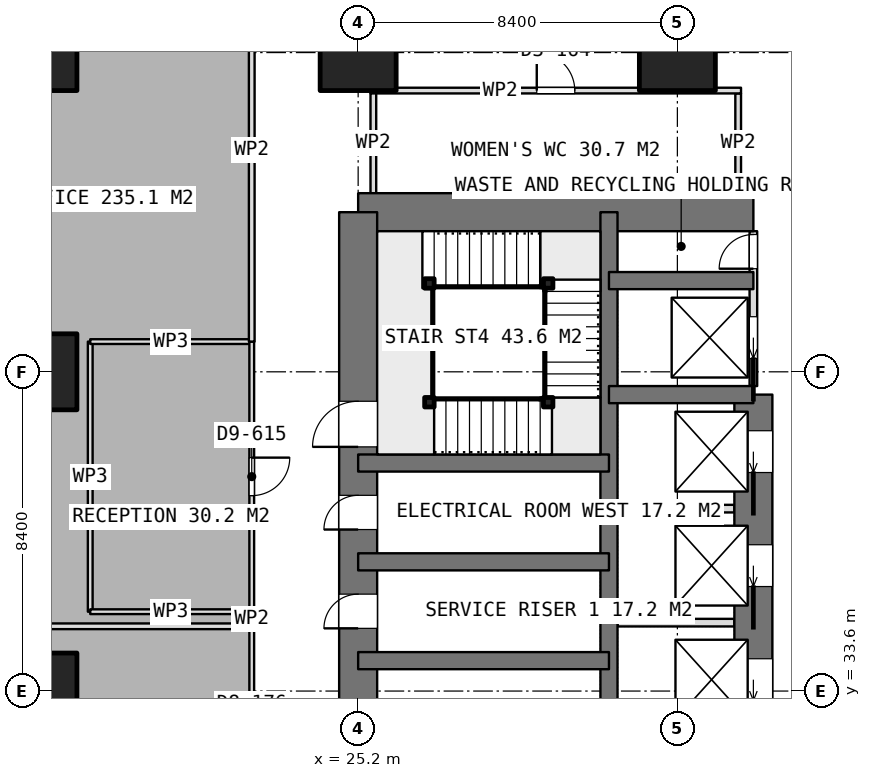
"""IFC4 building model, lengths in metres.
Left out: names, types, materials, properties, quantities, classifications, styles, units other than length and angle.
Written with IfcOpenShell. Run it as: python <this file> out.ifc"""

import sys

from ifc_helpers import new_model, si_unit, direction, frame, frame_2d, origin, origin_2d, place, context, subcontext, project, spatial, rectangle, extrude, element, fill, save


model = new_model("IFC4")
c1 = context("Model", 3, precision=1e-05, world=origin(), true_north=direction((0.0, 1.0)))
c2 = subcontext(c1, "Body", "Model", "MODEL_VIEW")
j1 = project(units=[si_unit("LENGTHUNIT", "METRE"), si_unit("PLANEANGLEUNIT", "RADIAN")], contexts=[c1])
p1 = place(None, origin())
s1 = spatial("IfcSite", under=j1, at=p1, CompositionType="ELEMENT")
p2 = place(p1, origin())
s2 = spatial("IfcBuilding", under=s1, at=p2, CompositionType="ELEMENT")
p3 = place(p2, frame((0.0, 0.0, 151.55)))
s3 = spatial("IfcBuildingStorey", under=s2, at=p3, CompositionType="ELEMENT", Elevation=151.55)
p4 = place(p3, frame((25.2, 46.2, 0.0), z_axis=(0.0, 0.0, 1.0), x_axis=(1.0, 0.0, 0.0)))
e1 = element("IfcWall", 1, at=p4, inside=s3, PredefinedType="SHEAR", context=c2, shape_type="SweptSolid", body=[
    extrude(rectangle(XDim=10.4, YDim=1.0, at=frame_2d((5.2, 0.0))), origin(), (0.0, 0.0, 1.0), 3.75),
])
p5 = place(p3, frame((25.2, 21.0, 0.0), z_axis=(0.0, 0.0, 1.0), x_axis=(0.0, 1.0, 0.0)))
e2 = element("IfcWall", 2, at=p5, inside=s3, PredefinedType="SHEAR", context=c2, shape_type="SweptSolid", body=[
    extrude(rectangle(XDim=25.2, YDim=1.0, at=frame_2d((12.6, 0.0))), origin(), (0.0, 0.0, 1.0), 3.75),
])
p6 = place(p5, frame((7.8, 0.0, 0.0)))
e3 = element("IfcOpeningElement", 3, at=p6, cuts=e2, PredefinedType="OPENING", context=c2, shape_type="SweptSolid", body=[
    extrude(rectangle(XDim=1.2, YDim=2.1, at=frame_2d((0.6, 1.05))), frame((0.0, 0.51, 0.0), z_axis=(0.0, -1.0, 0.0), x_axis=(1.0, 0.0, 0.0)), (0.0, 0.0, 1.0), 1.02),
])
p7 = place(p5, frame((14.25, 0.0, 0.0)))
e4 = element("IfcOpeningElement", 4, at=p7, cuts=e2, PredefinedType="OPENING", context=c2, shape_type="SweptSolid", body=[
    extrude(rectangle(XDim=0.9, YDim=2.1, at=frame_2d((0.45, 1.05))), frame((0.0, 0.51, 0.0), z_axis=(0.0, -1.0, 0.0), x_axis=(1.0, 0.0, 0.0)), (0.0, 0.0, 1.0), 1.02),
])
p8 = place(p5, frame((16.85, 0.0, 0.0)))
e5 = element("IfcOpeningElement", 5, at=p8, cuts=e2, PredefinedType="OPENING", context=c2, shape_type="SweptSolid", body=[
    extrude(rectangle(XDim=0.9, YDim=2.1, at=frame_2d((0.45, 1.05))), frame((0.0, 0.51, 0.0), z_axis=(0.0, -1.0, 0.0), x_axis=(1.0, 0.0, 0.0)), (0.0, 0.0, 1.0), 1.02),
])
p9 = place(p5, frame((19.025, 0.0, 0.0)))
e6 = element("IfcOpeningElement", 6, at=p9, cuts=e2, PredefinedType="OPENING", context=c2, shape_type="SweptSolid", body=[
    extrude(rectangle(XDim=1.2, YDim=2.1, at=frame_2d((0.6, 1.05))), frame((0.0, 0.51, 0.0), z_axis=(0.0, -1.0, 0.0), x_axis=(1.0, 0.0, 0.0)), (0.0, 0.0, 1.0), 1.02),
])
p10 = place(p3, frame((31.8, 21.0, 0.0), z_axis=(0.0, 0.0, 1.0), x_axis=(0.0, 1.0, 0.0)))
e7 = element("IfcWall", 7, at=p10, inside=s3, PredefinedType="SHEAR", context=c2, shape_type="SweptSolid", body=[
    extrude(rectangle(XDim=25.2, YDim=0.45, at=frame_2d((12.6, 0.0))), origin(), (0.0, 0.0, 1.0), 3.75),
])
p11 = place(p3, frame((35.6, 23.4, 0.0), z_axis=(0.0, 0.0, 1.0), x_axis=(0.0, 1.0, 0.0)))
e8 = element("IfcWall", 8, at=p11, inside=s3, PredefinedType="SHEAR", context=c2, shape_type="SweptSolid", body=[
    extrude(rectangle(XDim=18.0, YDim=1.0, at=frame_2d((9.0, 0.0))), origin(), (0.0, 0.0, 1.0), 3.75),
])
p12 = place(p11, frame((0.95, 0.0, 0.0)))
e9 = element("IfcOpeningElement", 9, at=p12, cuts=e8, PredefinedType="OPENING", context=c2, shape_type="SweptSolid", body=[
    extrude(rectangle(XDim=1.1, YDim=2.1, at=frame_2d((0.55, 1.05))), frame((0.0, 0.51, 0.0), z_axis=(0.0, -1.0, 0.0), x_axis=(1.0, 0.0, 0.0)), (0.0, 0.0, 1.0), 1.02),
])
p13 = place(p11, frame((3.95, 0.0, 0.0)))
e10 = element("IfcOpeningElement", 10, at=p13, cuts=e8, PredefinedType="OPENING", context=c2, shape_type="SweptSolid", body=[
    extrude(rectangle(XDim=1.1, YDim=2.1, at=frame_2d((0.55, 1.05))), frame((0.0, 0.51, 0.0), z_axis=(0.0, -1.0, 0.0), x_axis=(1.0, 0.0, 0.0)), (0.0, 0.0, 1.0), 1.02),
])
p14 = place(p11, frame((6.95, 0.0, 0.0)))
e11 = element("IfcOpeningElement", 11, at=p14, cuts=e8, PredefinedType="OPENING", context=c2, shape_type="SweptSolid", body=[
    extrude(rectangle(XDim=1.1, YDim=2.1, at=frame_2d((0.55, 1.05))), frame((0.0, 0.51, 0.0), z_axis=(0.0, -1.0, 0.0), x_axis=(1.0, 0.0, 0.0)), (0.0, 0.0, 1.0), 1.02),
])
p15 = place(p11, frame((9.95, 0.0, 0.0)))
e12 = element("IfcOpeningElement", 12, at=p15, cuts=e8, PredefinedType="OPENING", context=c2, shape_type="SweptSolid", body=[
    extrude(rectangle(XDim=1.1, YDim=2.1, at=frame_2d((0.55, 1.05))), frame((0.0, 0.51, 0.0), z_axis=(0.0, -1.0, 0.0), x_axis=(1.0, 0.0, 0.0)), (0.0, 0.0, 1.0), 1.02),
])
p16 = place(p11, frame((12.95, 0.0, 0.0)))
e13 = element("IfcOpeningElement", 13, at=p16, cuts=e8, PredefinedType="OPENING", context=c2, shape_type="SweptSolid", body=[
    extrude(rectangle(XDim=1.1, YDim=2.1, at=frame_2d((0.55, 1.05))), frame((0.0, 0.51, 0.0), z_axis=(0.0, -1.0, 0.0), x_axis=(1.0, 0.0, 0.0)), (0.0, 0.0, 1.0), 1.02),
])
p17 = place(p11, frame((15.95, 0.0, 0.0)))
e14 = element("IfcOpeningElement", 14, at=p17, cuts=e8, PredefinedType="OPENING", context=c2, shape_type="SweptSolid", body=[
    extrude(rectangle(XDim=1.1, YDim=2.1, at=frame_2d((0.55, 1.05))), frame((0.0, 0.51, 0.0), z_axis=(0.0, -1.0, 0.0), x_axis=(1.0, 0.0, 0.0)), (0.0, 0.0, 1.0), 1.02),
])
for number, where, z_axis, x_axis in (
    (15, (31.8, 41.4, 0.0), (0.0, 0.0, 1.0), (1.0, 0.0, 0.0)),
    (16, (31.8, 44.4, 0.0), (0.0, 0.0, 1.0), (1.0, 0.0, 0.0)),
):
    element("IfcWall", number, at=place(p3, frame(where, z_axis=z_axis, x_axis=x_axis)), inside=s3, PredefinedType="SHEAR", context=c2, shape_type="SweptSolid", body=[
        extrude(rectangle(XDim=3.8, YDim=0.45, at=frame_2d((1.9, 0.0))), origin(), (0.0, 0.0, 1.0), 3.75),
    ])
for number, where, z_axis, x_axis in (
    (17, (25.2, 34.4, 0.0), (0.0, 0.0, 1.0), (1.0, 0.0, 0.0)),
    (18, (25.2, 37.0, 0.0), (0.0, 0.0, 1.0), (1.0, 0.0, 0.0)),
    (19, (25.2, 39.6, 0.0), (0.0, 0.0, 1.0), (1.0, 0.0, 0.0)),
):
    element("IfcWall", number, at=place(p3, frame(where, z_axis=z_axis, x_axis=x_axis)), inside=s3, PredefinedType="SHEAR", context=c2, shape_type="SweptSolid", body=[
        extrude(rectangle(XDim=6.6, YDim=0.45, at=frame_2d((3.3, 0.0))), origin(), (0.0, 0.0, 1.0), 3.75),
    ])
for number, where, z_axis, x_axis in (
    (20, (16.8, 33.6, 0.0), (0.0, 0.0, 1.0), (1.0, 0.0, 0.0)),
    (21, (16.8, 42.0, 0.0), (0.0, 0.0, 1.0), (1.0, 0.0, 0.0)),
    (22, (16.8, 50.4, 0.0), (0.0, 0.0, 1.0), (1.0, 0.0, 0.0)),
    (23, (25.2, 50.4, 0.0), (0.0, 0.0, 1.0), (1.0, 0.0, 0.0)),
    (24, (33.6, 50.4, 0.0), (0.0, 0.0, 1.0), (1.0, 0.0, 0.0)),
):
    element("IfcColumn", number, at=place(p3, frame(where, z_axis=z_axis, x_axis=x_axis)), inside=s3, PredefinedType="COLUMN", context=c2, shape_type="SweptSolid", body=[
        extrude(rectangle(XDim=2.0, YDim=2.0, at=origin_2d()), origin(), (0.0, 0.0, 1.0), 3.75),
    ])
for number, where, z_axis, x_axis in (
    (25, (32.025, 35.4, 0.0), (0.0, 0.0, 1.0), (1.0, 0.0, 0.0)),
    (26, (32.025, 38.4, 0.0), (0.0, 0.0, 1.0), (1.0, 0.0, 0.0)),
):
    element("IfcWall", number, at=place(p3, frame(where, z_axis=z_axis, x_axis=x_axis)), inside=s3, PredefinedType="PARTITIONING", context=c2, shape_type="SweptSolid", body=[
        extrude(rectangle(XDim=3.075, YDim=0.2, at=frame_2d((1.538, 0.0))), origin(), (0.0, 0.0, 1.0), 3.5),
    ])
p18 = place(p3, frame((35.6, 41.625, 0.0), z_axis=(0.0, 0.0, 1.0), x_axis=(0.0, 1.0, 0.0)))
e27 = element("IfcWall", 27, at=p18, inside=s3, PredefinedType="PARTITIONING", context=c2, shape_type="SweptSolid", body=[
    extrude(rectangle(XDim=4.075, YDim=0.2, at=frame_2d((2.038, 0.0))), origin(), (0.0, 0.0, 1.0), 3.5),
])
p19 = place(p18, frame((3.088, 0.0, 0.0)))
e28 = element("IfcOpeningElement", 28, at=p19, cuts=e27, PredefinedType="OPENING", context=c2, shape_type="SweptSolid", body=[
    extrude(rectangle(XDim=0.9, YDim=2.1, at=frame_2d((0.45, 1.05))), frame((0.0, 0.11, 0.0), z_axis=(0.0, -1.0, 0.0), x_axis=(1.0, 0.0, 0.0)), (0.0, 0.0, 1.0), 0.22),
])
p20 = place(p18, frame((0.725, 0.0, 0.0)))
e29 = element("IfcOpeningElement", 29, at=p20, cuts=e27, PredefinedType="OPENING", context=c2, shape_type="SweptSolid", body=[
    extrude(rectangle(XDim=1.1, YDim=2.1, at=frame_2d((0.55, 1.05))), frame((0.0, 0.11, 0.0), z_axis=(0.0, -1.0, 0.0), x_axis=(1.0, 0.0, 0.0)), (0.0, 0.0, 1.0), 0.22),
])
p21 = place(p3, frame((25.525, 49.4, 0.0), z_axis=(0.0, 0.0, 1.0), x_axis=(1.0, 0.0, 0.0)))
e30 = element("IfcWall", 30, at=p21, inside=s3, PredefinedType="PARTITIONING", context=c2, shape_type="SweptSolid", body=[
    extrude(rectangle(XDim=9.75, YDim=0.15, at=frame_2d((4.875, 0.0))), origin(), (0.0, 0.0, 1.0), 3.5),
])
p22 = place(p21, frame((4.375, 0.0, 0.0)))
e31 = element("IfcOpeningElement", 31, at=p22, cuts=e30, PredefinedType="OPENING", context=c2, shape_type="SweptSolid", body=[
    extrude(rectangle(XDim=1.0, YDim=2.1, at=frame_2d((0.5, 1.05))), frame((0.0, 0.085, 0.0), z_axis=(0.0, -1.0, 0.0), x_axis=(1.0, 0.0, 0.0)), (0.0, 0.0, 1.0), 0.17),
])
for number, where, z_axis, x_axis in (
    (32, (25.6, 46.7, 0.0), (0.0, 0.0, 1.0), (0.0, 1.0, 0.0)),
    (33, (35.2, 46.7, 0.0), (0.0, 0.0, 1.0), (0.0, 1.0, 0.0)),
):
    element("IfcWall", number, at=place(p3, frame(where, z_axis=z_axis, x_axis=x_axis)), inside=s3, PredefinedType="PARTITIONING", context=c2, shape_type="SweptSolid", body=[
        extrude(rectangle(XDim=2.625, YDim=0.15, at=frame_2d((1.312, 0.0))), origin(), (0.0, 0.0, 1.0), 3.5),
    ])
p23 = place(p3, frame((18.15, 35.688, 0.0), z_axis=(0.0, 0.0, 1.0), x_axis=(0.0, 1.0, 0.0)))
e34 = element("IfcWall", 34, at=p23, inside=s3, PredefinedType="PARTITIONING", context=c2, shape_type="SweptSolid", body=[
    extrude(rectangle(XDim=7.107, YDim=0.125, at=frame_2d((3.553, 0.0))), origin(), (0.0, 0.0, 1.0), 3.5),
])
p24 = place(p3, frame((18.15, 42.795, 0.0), z_axis=(0.0, 0.0, 1.0), x_axis=(1.0, 0.0, 0.0)))
e35 = element("IfcWall", 35, at=p24, inside=s3, PredefinedType="PARTITIONING", context=c2, shape_type="SweptSolid", body=[
    extrude(rectangle(XDim=4.25, YDim=0.125, at=frame_2d((2.125, 0.0))), origin(), (0.0, 0.0, 1.0), 3.5),
])
p25 = place(p3, frame((22.4, 42.795, 0.0), z_axis=(0.0, 0.0, 1.0), x_axis=(0.0, -1.0, 0.0)))
e36 = element("IfcWall", 36, at=p25, inside=s3, PredefinedType="PARTITIONING", context=c2, shape_type="SweptSolid", body=[
    extrude(rectangle(XDim=7.107, YDim=0.125, at=frame_2d((3.553, 0.0))), origin(), (0.0, 0.0, 1.0), 3.5),
])
p26 = place(p25, frame((3.053, 0.0, 0.0)))
e37 = element("IfcOpeningElement", 37, at=p26, cuts=e36, PredefinedType="OPENING", context=c2, shape_type="SweptSolid", body=[
    extrude(rectangle(XDim=1.0, YDim=2.1, at=frame_2d((0.5, 1.05))), frame((0.0, 0.073, 0.0), z_axis=(0.0, -1.0, 0.0), x_axis=(1.0, 0.0, 0.0)), (0.0, 0.0, 1.0), 0.145),
])
p27 = place(p3, frame((22.4, 35.688, 0.0), z_axis=(0.0, 0.0, 1.0), x_axis=(-1.0, 0.0, 0.0)))
e38 = element("IfcWall", 38, at=p27, inside=s3, PredefinedType="PARTITIONING", context=c2, shape_type="SweptSolid", body=[
    extrude(rectangle(XDim=4.25, YDim=0.125, at=frame_2d((2.125, 0.0))), origin(), (0.0, 0.0, 1.0), 3.5),
])
p28 = place(p3, frame((22.4, 35.688, 0.0), z_axis=(0.0, 0.0, 1.0), x_axis=(0.0, -1.0, 0.0)))
e39 = element("IfcWall", 39, at=p28, inside=s3, PredefinedType="PARTITIONING", context=c2, shape_type="SweptSolid", body=[
    extrude(rectangle(XDim=0.384, YDim=0.15, at=frame_2d((0.192, 0.0))), origin(), (0.0, 0.0, 1.0), 3.5),
])
p29 = place(p3, frame((22.4, 35.304, 0.0), z_axis=(0.0, 0.0, 1.0), x_axis=(-1.0, 0.0, 0.0)))
e40 = element("IfcWall", 40, at=p29, inside=s3, PredefinedType="PARTITIONING", context=c2, shape_type="SweptSolid", body=[
    extrude(rectangle(XDim=16.045, YDim=0.15, at=frame_2d((8.022, 0.0))), origin(), (0.0, 0.0, 1.0), 3.5),
])
p30 = place(p3, frame((22.4, 52.9, 0.0), z_axis=(0.0, 0.0, 1.0), x_axis=(0.0, -1.0, 0.0)))
e41 = element("IfcWall", 41, at=p30, inside=s3, PredefinedType="PARTITIONING", context=c2, shape_type="SweptSolid", body=[
    extrude(rectangle(XDim=10.105, YDim=0.15, at=frame_2d((5.052, 0.0))), origin(), (0.0, 0.0, 1.0), 3.5),
])
p31 = place(p3, frame((22.4, 35.304, 0.0), z_axis=(0.0, 0.0, 1.0), x_axis=(0.0, -1.0, 0.0)))
e42 = element("IfcWall", 42, at=p31, inside=s3, PredefinedType="PARTITIONING", context=c2, shape_type="SweptSolid", body=[
    extrude(rectangle(XDim=7.229, YDim=0.125, at=frame_2d((3.615, 0.0))), origin(), (0.0, 0.0, 1.0), 3.5),
])
p32 = place(p31, frame((2.752, 0.0, 0.0)))
e43 = element("IfcOpeningElement", 43, at=p32, cuts=e42, PredefinedType="OPENING", context=c2, shape_type="SweptSolid", body=[
    extrude(rectangle(XDim=1.8, YDim=2.1, at=frame_2d((0.9, 1.05))), frame((0.0, 0.073, 0.0), z_axis=(0.0, -1.0, 0.0), x_axis=(1.0, 0.0, 0.0)), (0.0, 0.0, 1.0), 0.145),
])
for number, where, z_axis, x_axis in (
    (44, (27.075, 41.2, 0.0), (0.0, 0.0, 1.0), (1.0, 0.0, 0.0)),
    (45, (30.2, 41.2, 0.0), (0.0, 0.0, 1.0), (1.0, 0.0, 0.0)),
    (46, (30.2, 44.325, 0.0), (0.0, 0.0, 1.0), (1.0, 0.0, 0.0)),
    (47, (27.075, 44.325, 0.0), (0.0, 0.0, 1.0), (1.0, 0.0, 0.0)),
):
    element("IfcColumn", number, at=place(p3, frame(where, z_axis=z_axis, x_axis=x_axis)), inside=s3, PredefinedType="COLUMN", context=c2, shape_type="SweptSolid", body=[
        extrude(rectangle(XDim=0.25, YDim=0.25, at=origin_2d()), origin(), (0.0, 0.0, 1.0), 3.75),
    ])
p33 = place(p7, origin())
e48 = element("IfcDoor", 48, at=p33, inside=s3, OperationType="SINGLE_SWING_LEFT", PredefinedType="DOOR", context=c2, shape_type="SweptSolid", body=[
    extrude(rectangle(XDim=0.9, YDim=2.1, at=frame_2d((0.45, 1.05))), frame((0.0, 0.025, 0.0), z_axis=(0.0, -1.0, 0.0), x_axis=(1.0, 0.0, 0.0)), (0.0, 0.0, 1.0), 0.05),
])
fill(e4, e48)
p34 = place(p8, origin())
e49 = element("IfcDoor", 49, at=p34, inside=s3, OperationType="SINGLE_SWING_LEFT", PredefinedType="DOOR", context=c2, shape_type="SweptSolid", body=[
    extrude(rectangle(XDim=0.9, YDim=2.1, at=frame_2d((0.45, 1.05))), frame((0.0, 0.025, 0.0), z_axis=(0.0, -1.0, 0.0), x_axis=(1.0, 0.0, 0.0)), (0.0, 0.0, 1.0), 0.05),
])
fill(e5, e49)
p35 = place(p19, origin())
e50 = element("IfcDoor", 50, at=p35, inside=s3, OperationType="SINGLE_SWING_LEFT", PredefinedType="DOOR", context=c2, shape_type="SweptSolid", body=[
    extrude(rectangle(XDim=0.9, YDim=2.1, at=frame_2d((0.45, 1.05))), frame((0.0, 0.025, 0.0), z_axis=(0.0, -1.0, 0.0), x_axis=(1.0, 0.0, 0.0)), (0.0, 0.0, 1.0), 0.05),
])
fill(e28, e50)
p36 = place(p15, origin())
e51 = element("IfcDoor", 51, at=p36, inside=s3, OperationType="SLIDING_TO_LEFT", PredefinedType="USERDEFINED", context=c2, shape_type="SweptSolid", body=[
    extrude(rectangle(XDim=1.1, YDim=2.1, at=frame_2d((0.55, 1.05))), frame((0.0, 0.025, 0.0), z_axis=(0.0, -1.0, 0.0), x_axis=(1.0, 0.0, 0.0)), (0.0, 0.0, 1.0), 0.05),
])
fill(e12, e51)
p37 = place(p16, origin())
e52 = element("IfcDoor", 52, at=p37, inside=s3, OperationType="SLIDING_TO_LEFT", PredefinedType="USERDEFINED", context=c2, shape_type="SweptSolid", body=[
    extrude(rectangle(XDim=1.1, YDim=2.1, at=frame_2d((0.55, 1.05))), frame((0.0, 0.025, 0.0), z_axis=(0.0, -1.0, 0.0), x_axis=(1.0, 0.0, 0.0)), (0.0, 0.0, 1.0), 0.05),
])
fill(e13, e52)
p38 = place(p17, origin())
e53 = element("IfcDoor", 53, at=p38, inside=s3, OperationType="SLIDING_TO_LEFT", PredefinedType="USERDEFINED", context=c2, shape_type="SweptSolid", body=[
    extrude(rectangle(XDim=1.1, YDim=2.1, at=frame_2d((0.55, 1.05))), frame((0.0, 0.025, 0.0), z_axis=(0.0, -1.0, 0.0), x_axis=(1.0, 0.0, 0.0)), (0.0, 0.0, 1.0), 0.05),
])
fill(e14, e53)
p39 = place(p20, origin())
e54 = element("IfcDoor", 54, at=p39, inside=s3, OperationType="SLIDING_TO_LEFT", PredefinedType="USERDEFINED", context=c2, shape_type="SweptSolid", body=[
    extrude(rectangle(XDim=1.1, YDim=2.1, at=frame_2d((0.55, 1.05))), frame((0.0, 0.025, 0.0), z_axis=(0.0, -1.0, 0.0), x_axis=(1.0, 0.0, 0.0)), (0.0, 0.0, 1.0), 0.05),
])
fill(e29, e54)
p40 = place(p22, origin())
e55 = element("IfcDoor", 55, at=p40, inside=s3, OperationType="SINGLE_SWING_LEFT", PredefinedType="DOOR", context=c2, shape_type="SweptSolid", body=[
    extrude(rectangle(XDim=1.0, YDim=2.1, at=frame_2d((0.5, 1.05))), frame((0.0, 0.025, 0.0), z_axis=(0.0, -1.0, 0.0), x_axis=(1.0, 0.0, 0.0)), (0.0, 0.0, 1.0), 0.05),
])
fill(e31, e55)
p41 = place(p26, origin())
e56 = element("IfcDoor", 56, at=p41, inside=s3, OperationType="SINGLE_SWING_LEFT", PredefinedType="DOOR", context=c2, shape_type="SweptSolid", body=[
    extrude(rectangle(XDim=1.0, YDim=2.1, at=frame_2d((0.5, 1.05))), frame((0.0, 0.025, 0.0), z_axis=(0.0, -1.0, 0.0), x_axis=(1.0, 0.0, 0.0)), (0.0, 0.0, 1.0), 0.05),
])
fill(e37, e56)
p42 = place(p9, origin())
e57 = element("IfcDoor", 57, at=p42, inside=s3, OperationType="SINGLE_SWING_RIGHT", PredefinedType="DOOR", context=c2, shape_type="SweptSolid", body=[
    extrude(rectangle(XDim=1.2, YDim=2.1, at=frame_2d((0.6, 1.05))), frame((0.0, 0.025, 0.0), z_axis=(0.0, -1.0, 0.0), x_axis=(1.0, 0.0, 0.0)), (0.0, 0.0, 1.0), 0.05),
])
fill(e6, e57)
save(model, sys.argv[1])
